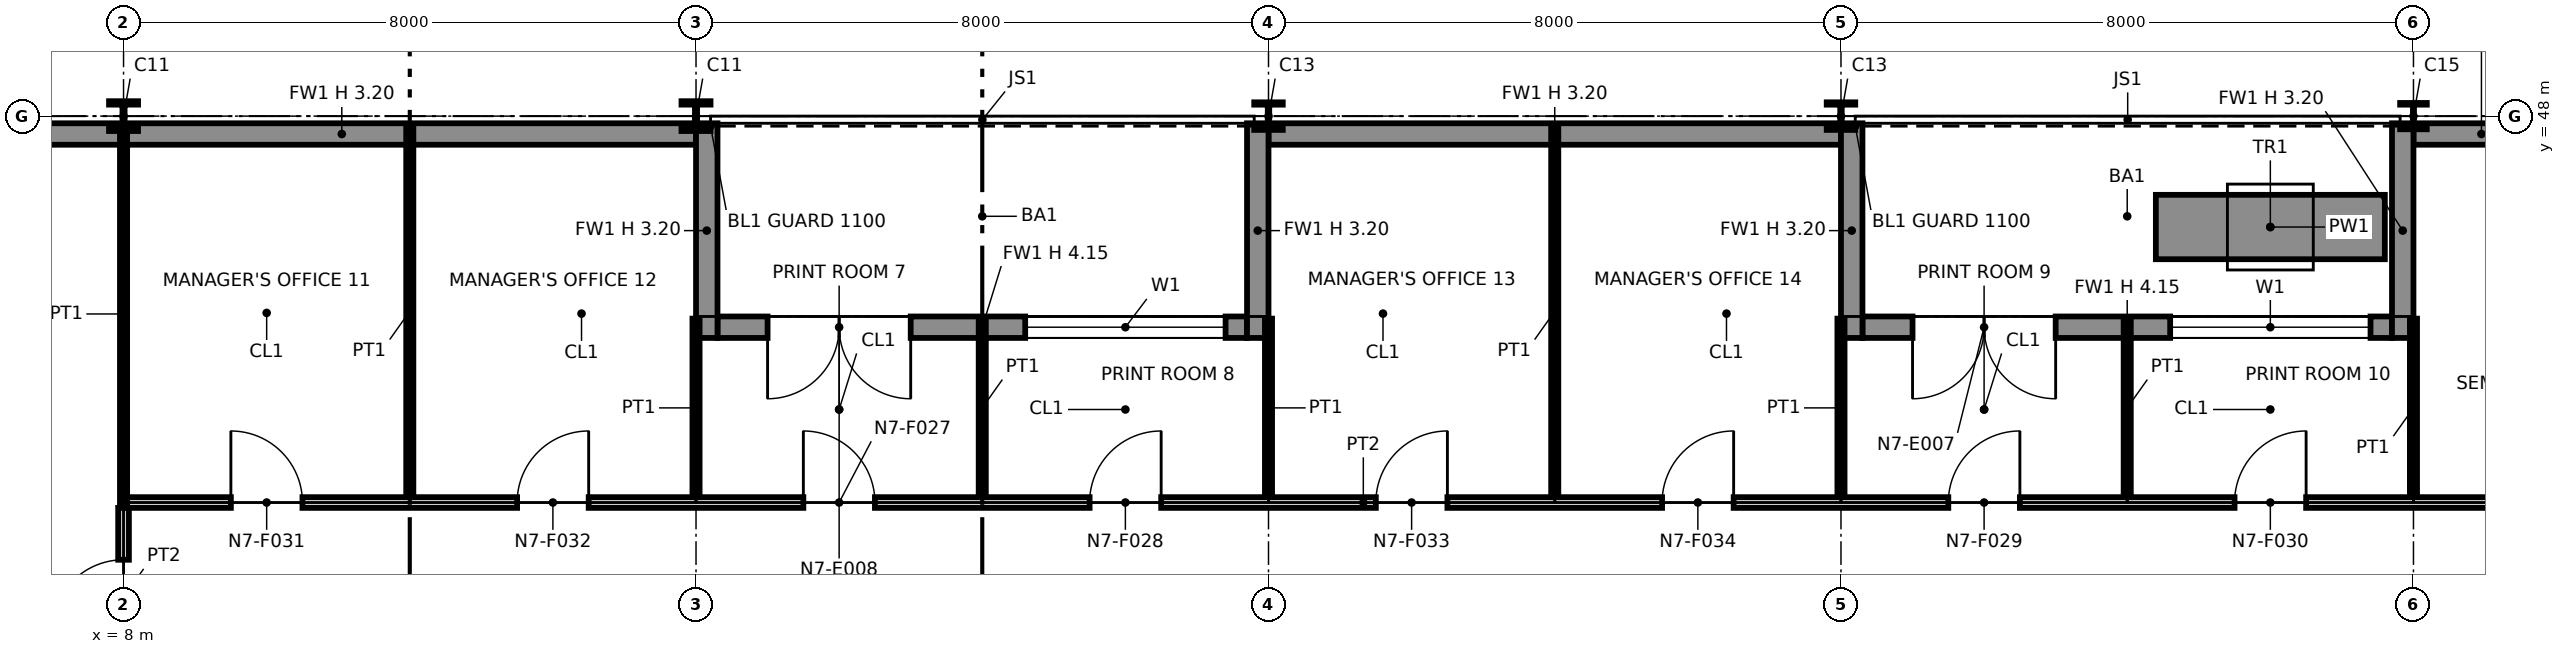
"""IFC4 building model, lengths in metres.
Left out: names, types, materials, properties, quantities, classifications, styles, units other than length and angle.
Written with IfcOpenShell. Run it as: python <this file> out.ifc"""

import sys

from ifc_helpers import new_model, si_unit, direction, frame, frame_2d, origin, origin_2d, place, context, subcontext, project, spatial, rectangle, i_section, extrude, element, fill, save


model = new_model("IFC4")
c1 = context("Model", 3, precision=1e-05, world=origin(), true_north=direction((0.0, 1.0)))
c2 = subcontext(c1, "Body", "Model", "MODEL_VIEW")
j1 = project(units=[si_unit("LENGTHUNIT", "METRE"), si_unit("PLANEANGLEUNIT", "RADIAN")], contexts=[c1])
p1 = place(None, origin())
s1 = spatial("IfcSite", under=j1, at=p1, CompositionType="ELEMENT")
p2 = place(p1, origin())
s2 = spatial("IfcBuilding", under=s1, at=p2, CompositionType="ELEMENT")
p3 = place(p2, frame((0.0, 0.0, 109.6)))
s3 = spatial("IfcBuildingStorey", under=s2, at=p3, CompositionType="ELEMENT", Elevation=109.6)
for number, where, z_axis, x_axis in (
    (1, (8.0, 48.0, 0.0), (0.0, 0.0, 1.0), (1.0, 0.0, 0.0)),
    (2, (16.0, 48.0, 0.0), (0.0, 0.0, 1.0), (1.0, 0.0, 0.0)),
):
    element("IfcColumn", number, at=place(p3, frame(where, z_axis=z_axis, x_axis=x_axis)), inside=s3, PredefinedType="COLUMN", context=c2, shape_type="SweptSolid", body=[
        extrude(i_section(OverallWidth=0.406, OverallDepth=0.417, WebThickness=0.03, FlangeThickness=0.048, at=origin_2d()), origin(), (0.0, 0.0, 1.0), 4.15),
    ])
for number, where, z_axis, x_axis in (
    (3, (24.0, 48.0, 0.0), (0.0, 0.0, 1.0), (1.0, 0.0, 0.0)),
    (4, (32.0, 48.0, 0.0), (0.0, 0.0, 1.0), (1.0, 0.0, 0.0)),
):
    element("IfcColumn", number, at=place(p3, frame(where, z_axis=z_axis, x_axis=x_axis)), inside=s3, PredefinedType="COLUMN", context=c2, shape_type="SweptSolid", body=[
        extrude(i_section(OverallWidth=0.399, OverallDepth=0.386, WebThickness=0.021, FlangeThickness=0.033, at=origin_2d()), origin(), (0.0, 0.0, 1.0), 4.15),
    ])
p4 = place(p3, frame((40.0, 48.0, 0.0), z_axis=(0.0, 0.0, 1.0), x_axis=(1.0, 0.0, 0.0)))
e5 = element("IfcColumn", 5, at=p4, inside=s3, PredefinedType="COLUMN", context=c2, shape_type="SweptSolid", body=[
    extrude(i_section(OverallWidth=0.373, OverallDepth=0.368, WebThickness=0.015, FlangeThickness=0.024, at=origin_2d()), origin(), (0.0, 0.0, 1.0), 4.15),
])
p5 = place(p3, frame((41.9, 47.75, 0.0), z_axis=(0.0, 0.0, 1.0), x_axis=(-1.0, 0.0, 0.0)))
e6 = element("IfcWall", 6, at=p5, inside=s3, PredefinedType="SOLIDWALL", context=c2, shape_type="SweptSolid", body=[
    extrude(rectangle(XDim=1.9, YDim=0.3, at=frame_2d((0.95, 0.0))), origin(), (0.0, 0.0, 1.0), 3.199),
])
p6 = place(p3, frame((39.7, 45.05, 0.0), z_axis=(0.0, 0.0, 1.0), x_axis=(-1.0, 0.0, 0.0)))
e7 = element("IfcWall", 7, at=p6, inside=s3, PredefinedType="SOLIDWALL", context=c2, shape_type="SweptSolid", body=[
    extrude(rectangle(XDim=7.4, YDim=0.3, at=frame_2d((3.7, 0.0))), origin(), (0.0, 0.0, 1.0), 4.15),
])
p7 = place(p6, frame((0.3, 0.0, 0.9)))
e8 = element("IfcOpeningElement", 8, at=p7, cuts=e7, PredefinedType="OPENING", context=c2, shape_type="SweptSolid", body=[
    extrude(rectangle(XDim=2.8, YDim=2.2, at=frame_2d((1.4, 1.1))), frame((0.0, 0.16, 0.0), z_axis=(0.0, -1.0, 0.0), x_axis=(1.0, 0.0, 0.0)), (0.0, 0.0, 1.0), 0.32),
])
p8 = place(p6, frame((4.7, 0.0, 0.0)))
e9 = element("IfcOpeningElement", 9, at=p8, cuts=e7, PredefinedType="OPENING", context=c2, shape_type="SweptSolid", body=[
    extrude(rectangle(XDim=2.0, YDim=2.4, at=frame_2d((1.0, 1.2))), frame((0.0, 0.16, 0.0), z_axis=(0.0, -1.0, 0.0), x_axis=(1.0, 0.0, 0.0)), (0.0, 0.0, 1.0), 0.32),
])
for number, where, z_axis, x_axis in (
    (10, (39.85, 47.9, 0.0), (0.0, 0.0, 1.0), (0.0, -1.0, 0.0)),
    (11, (32.15, 47.9, 0.0), (0.0, 0.0, 1.0), (0.0, -1.0, 0.0)),
):
    element("IfcWall", number, at=place(p3, frame(where, z_axis=z_axis, x_axis=x_axis)), inside=s3, PredefinedType="SOLIDWALL", context=c2, shape_type="SweptSolid", body=[
        extrude(rectangle(XDim=3.0, YDim=0.3, at=frame_2d((1.5, 0.0))), origin(), (0.0, 0.0, 1.0), 3.199),
    ])
p9 = place(p3, frame((32.0, 47.75, 0.0), z_axis=(0.0, 0.0, 1.0), x_axis=(-1.0, 0.0, 0.0)))
e12 = element("IfcWall", 12, at=p9, inside=s3, PredefinedType="SOLIDWALL", context=c2, shape_type="SweptSolid", body=[
    extrude(rectangle(XDim=8.0, YDim=0.3, at=frame_2d((4.0, 0.0))), origin(), (0.0, 0.0, 1.0), 3.199),
])
p10 = place(p3, frame((23.7, 45.05, 0.0), z_axis=(0.0, 0.0, 1.0), x_axis=(-1.0, 0.0, 0.0)))
e13 = element("IfcWall", 13, at=p10, inside=s3, PredefinedType="SOLIDWALL", context=c2, shape_type="SweptSolid", body=[
    extrude(rectangle(XDim=7.4, YDim=0.3, at=frame_2d((3.7, 0.0))), origin(), (0.0, 0.0, 1.0), 4.15),
])
p11 = place(p10, frame((0.3, 0.0, 0.9)))
e14 = element("IfcOpeningElement", 14, at=p11, cuts=e13, PredefinedType="OPENING", context=c2, shape_type="SweptSolid", body=[
    extrude(rectangle(XDim=2.8, YDim=2.2, at=frame_2d((1.4, 1.1))), frame((0.0, 0.16, 0.0), z_axis=(0.0, -1.0, 0.0), x_axis=(1.0, 0.0, 0.0)), (0.0, 0.0, 1.0), 0.32),
])
p12 = place(p10, frame((4.7, 0.0, 0.0)))
e15 = element("IfcOpeningElement", 15, at=p12, cuts=e13, PredefinedType="OPENING", context=c2, shape_type="SweptSolid", body=[
    extrude(rectangle(XDim=2.0, YDim=2.4, at=frame_2d((1.0, 1.2))), frame((0.0, 0.16, 0.0), z_axis=(0.0, -1.0, 0.0), x_axis=(1.0, 0.0, 0.0)), (0.0, 0.0, 1.0), 0.32),
])
for number, where, z_axis, x_axis in (
    (16, (23.85, 47.9, 0.0), (0.0, 0.0, 1.0), (0.0, -1.0, 0.0)),
    (17, (16.15, 47.9, 0.0), (0.0, 0.0, 1.0), (0.0, -1.0, 0.0)),
):
    element("IfcWall", number, at=place(p3, frame(where, z_axis=z_axis, x_axis=x_axis)), inside=s3, PredefinedType="SOLIDWALL", context=c2, shape_type="SweptSolid", body=[
        extrude(rectangle(XDim=3.0, YDim=0.3, at=frame_2d((1.5, 0.0))), origin(), (0.0, 0.0, 1.0), 3.199),
    ])
p13 = place(p3, frame((16.0, 47.75, 0.0), z_axis=(0.0, 0.0, 1.0), x_axis=(-1.0, 0.0, 0.0)))
e18 = element("IfcWall", 18, at=p13, inside=s3, PredefinedType="SOLIDWALL", context=c2, shape_type="SweptSolid", body=[
    extrude(rectangle(XDim=9.9, YDim=0.3, at=frame_2d((4.95, 0.0))), origin(), (0.0, 0.0, 1.0), 3.199),
])
p14 = place(p3, frame((39.6, 46.45, 0.0), z_axis=(0.0, 0.0, 1.0), x_axis=(-1.0, 0.0, 0.0)))
e19 = element("IfcWall", 19, at=p14, inside=s3, PredefinedType="SOLIDWALL", context=c2, shape_type="SweptSolid", body=[
    extrude(rectangle(XDim=3.2, YDim=0.9, at=frame_2d((1.6, 0.0))), origin(), (0.0, 0.0, 1.0), 0.6),
])
p15 = place(p3, frame((8.0, 40.03, 0.0), z_axis=(0.0, 0.0, 1.0), x_axis=(0.0, 1.0, 0.0)))
e20 = element("IfcWall", 20, at=p15, inside=s3, PredefinedType="PARTITIONING", context=c2, shape_type="SweptSolid", body=[
    extrude(rectangle(XDim=2.495, YDim=0.15, at=frame_2d((1.248, 0.0))), origin(), (0.0, 0.0, 1.0), 3.194),
])
p16 = place(p15, frame((0.77, 0.0, 0.0)))
e21 = element("IfcOpeningElement", 21, at=p16, cuts=e20, PredefinedType="OPENING", context=c2, shape_type="SweptSolid", body=[
    extrude(rectangle(XDim=1.0, YDim=2.1, at=frame_2d((0.5, 1.05))), frame((0.0, 0.085, 0.0), z_axis=(0.0, -1.0, 0.0), x_axis=(1.0, 0.0, 0.0)), (0.0, 0.0, 1.0), 0.17),
])
p17 = place(p3, frame((8.05, 42.6, 0.0), z_axis=(0.0, 0.0, 1.0), x_axis=(1.0, 0.0, 0.0)))
e22 = element("IfcWall", 22, at=p17, inside=s3, PredefinedType="PARTITIONING", context=c2, shape_type="SweptSolid", body=[
    extrude(rectangle(XDim=34.55, YDim=0.15, at=frame_2d((17.275, 0.0))), origin(), (0.0, 0.0, 1.0), 3.194),
])
p18 = place(p17, frame((9.45, 0.0, 0.0)))
e23 = element("IfcOpeningElement", 23, at=p18, cuts=e22, PredefinedType="OPENING", context=c2, shape_type="SweptSolid", body=[
    extrude(rectangle(XDim=1.0, YDim=2.1, at=frame_2d((0.5, 1.05))), frame((0.0, 0.085, 0.0), z_axis=(0.0, -1.0, 0.0), x_axis=(1.0, 0.0, 0.0)), (0.0, 0.0, 1.0), 0.17),
])
p19 = place(p17, frame((13.45, 0.0, 0.0)))
e24 = element("IfcOpeningElement", 24, at=p19, cuts=e22, PredefinedType="OPENING", context=c2, shape_type="SweptSolid", body=[
    extrude(rectangle(XDim=1.0, YDim=2.1, at=frame_2d((0.5, 1.05))), frame((0.0, 0.085, 0.0), z_axis=(0.0, -1.0, 0.0), x_axis=(1.0, 0.0, 0.0)), (0.0, 0.0, 1.0), 0.17),
])
p20 = place(p17, frame((25.45, 0.0, 0.0)))
e25 = element("IfcOpeningElement", 25, at=p20, cuts=e22, PredefinedType="OPENING", context=c2, shape_type="SweptSolid", body=[
    extrude(rectangle(XDim=1.0, YDim=2.1, at=frame_2d((0.5, 1.05))), frame((0.0, 0.085, 0.0), z_axis=(0.0, -1.0, 0.0), x_axis=(1.0, 0.0, 0.0)), (0.0, 0.0, 1.0), 0.17),
])
p21 = place(p17, frame((29.45, 0.0, 0.0)))
e26 = element("IfcOpeningElement", 26, at=p21, cuts=e22, PredefinedType="OPENING", context=c2, shape_type="SweptSolid", body=[
    extrude(rectangle(XDim=1.0, YDim=2.1, at=frame_2d((0.5, 1.05))), frame((0.0, 0.085, 0.0), z_axis=(0.0, -1.0, 0.0), x_axis=(1.0, 0.0, 0.0)), (0.0, 0.0, 1.0), 0.17),
])
p22 = place(p17, frame((1.45, 0.0, 0.0)))
e27 = element("IfcOpeningElement", 27, at=p22, cuts=e22, PredefinedType="OPENING", context=c2, shape_type="SweptSolid", body=[
    extrude(rectangle(XDim=1.0, YDim=2.1, at=frame_2d((0.5, 1.05))), frame((0.0, 0.085, 0.0), z_axis=(0.0, -1.0, 0.0), x_axis=(1.0, 0.0, 0.0)), (0.0, 0.0, 1.0), 0.17),
])
p23 = place(p17, frame((5.45, 0.0, 0.0)))
e28 = element("IfcOpeningElement", 28, at=p23, cuts=e22, PredefinedType="OPENING", context=c2, shape_type="SweptSolid", body=[
    extrude(rectangle(XDim=1.0, YDim=2.1, at=frame_2d((0.5, 1.05))), frame((0.0, 0.085, 0.0), z_axis=(0.0, -1.0, 0.0), x_axis=(1.0, 0.0, 0.0)), (0.0, 0.0, 1.0), 0.17),
])
p24 = place(p17, frame((17.45, 0.0, 0.0)))
e29 = element("IfcOpeningElement", 29, at=p24, cuts=e22, PredefinedType="OPENING", context=c2, shape_type="SweptSolid", body=[
    extrude(rectangle(XDim=1.0, YDim=2.1, at=frame_2d((0.5, 1.05))), frame((0.0, 0.085, 0.0), z_axis=(0.0, -1.0, 0.0), x_axis=(1.0, 0.0, 0.0)), (0.0, 0.0, 1.0), 0.17),
])
p25 = place(p17, frame((21.45, 0.0, 0.0)))
e30 = element("IfcOpeningElement", 30, at=p25, cuts=e22, PredefinedType="OPENING", context=c2, shape_type="SweptSolid", body=[
    extrude(rectangle(XDim=1.0, YDim=2.1, at=frame_2d((0.5, 1.05))), frame((0.0, 0.085, 0.0), z_axis=(0.0, -1.0, 0.0), x_axis=(1.0, 0.0, 0.0)), (0.0, 0.0, 1.0), 0.17),
])
p26 = place(p3, frame((8.0, 42.6, 0.0), z_axis=(0.0, 0.0, 1.0), x_axis=(0.0, 1.0, 0.0)))
e31 = element("IfcWall", 31, at=p26, inside=s3, PredefinedType="PARTITIONING", context=c2, shape_type="SweptSolid", body=[
    extrude(rectangle(XDim=5.27, YDim=0.1, at=frame_2d((2.635, 0.0))), origin(), (0.0, 0.0, 1.0), 3.194),
])
p27 = place(p3, frame((12.0, 42.675, 0.0), z_axis=(0.0, 0.0, 1.0), x_axis=(0.0, 1.0, 0.0)))
e32 = element("IfcWall", 32, at=p27, inside=s3, PredefinedType="PARTITIONING", context=c2, shape_type="SweptSolid", body=[
    extrude(rectangle(XDim=5.195, YDim=0.1, at=frame_2d((2.598, 0.0))), origin(), (0.0, 0.0, 1.0), 3.194),
])
for number, where, z_axis, x_axis in (
    (33, (16.0, 42.675, 0.0), (0.0, 0.0, 1.0), (0.0, 1.0, 0.0)),
    (34, (20.0, 42.675, 0.0), (0.0, 0.0, 1.0), (0.0, 1.0, 0.0)),
    (35, (24.0, 42.675, 0.0), (0.0, 0.0, 1.0), (0.0, 1.0, 0.0)),
):
    element("IfcWall", number, at=place(p3, frame(where, z_axis=z_axis, x_axis=x_axis)), inside=s3, PredefinedType="PARTITIONING", context=c2, shape_type="SweptSolid", body=[
        extrude(rectangle(XDim=2.495, YDim=0.1, at=frame_2d((1.248, 0.0))), origin(), (0.0, 0.0, 1.0), 3.194),
    ])
p28 = place(p3, frame((28.0, 42.675, 0.0), z_axis=(0.0, 0.0, 1.0), x_axis=(0.0, 1.0, 0.0)))
e36 = element("IfcWall", 36, at=p28, inside=s3, PredefinedType="PARTITIONING", context=c2, shape_type="SweptSolid", body=[
    extrude(rectangle(XDim=5.195, YDim=0.1, at=frame_2d((2.598, 0.0))), origin(), (0.0, 0.0, 1.0), 3.194),
])
for number, where, z_axis, x_axis in (
    (37, (32.0, 42.675, 0.0), (0.0, 0.0, 1.0), (0.0, 1.0, 0.0)),
    (38, (36.0, 42.675, 0.0), (0.0, 0.0, 1.0), (0.0, 1.0, 0.0)),
    (39, (40.0, 42.675, 0.0), (0.0, 0.0, 1.0), (0.0, 1.0, 0.0)),
):
    element("IfcWall", number, at=place(p3, frame(where, z_axis=z_axis, x_axis=x_axis)), inside=s3, PredefinedType="PARTITIONING", context=c2, shape_type="SweptSolid", body=[
        extrude(rectangle(XDim=2.495, YDim=0.1, at=frame_2d((1.248, 0.0))), origin(), (0.0, 0.0, 1.0), 3.194),
    ])
p29 = place(p7, origin())
e40 = element("IfcWindow", 40, at=p29, inside=s3, PartitioningType="SINGLE_PANEL", PredefinedType="WINDOW", context=c2, shape_type="SweptSolid", body=[
    extrude(rectangle(XDim=2.8, YDim=2.2, at=frame_2d((1.4, 1.1))), frame((0.0, 0.03, 0.0), z_axis=(0.0, -1.0, 0.0), x_axis=(1.0, 0.0, 0.0)), (0.0, 0.0, 1.0), 0.06),
])
fill(e8, e40)
p30 = place(p8, origin())
e41 = element("IfcDoor", 41, at=p30, inside=s3, OperationType="DOUBLE_DOOR_SINGLE_SWING", PredefinedType="DOOR", context=c2, shape_type="SweptSolid", body=[
    extrude(rectangle(XDim=2.0, YDim=2.4, at=frame_2d((1.0, 1.2))), frame((0.0, 0.025, 0.0), z_axis=(0.0, -1.0, 0.0), x_axis=(1.0, 0.0, 0.0)), (0.0, 0.0, 1.0), 0.05),
])
fill(e9, e41)
p31 = place(p11, origin())
e42 = element("IfcWindow", 42, at=p31, inside=s3, PartitioningType="SINGLE_PANEL", PredefinedType="WINDOW", context=c2, shape_type="SweptSolid", body=[
    extrude(rectangle(XDim=2.8, YDim=2.2, at=frame_2d((1.4, 1.1))), frame((0.0, 0.03, 0.0), z_axis=(0.0, -1.0, 0.0), x_axis=(1.0, 0.0, 0.0)), (0.0, 0.0, 1.0), 0.06),
])
fill(e14, e42)
p32 = place(p12, origin())
e43 = element("IfcDoor", 43, at=p32, inside=s3, OperationType="DOUBLE_DOOR_SINGLE_SWING", PredefinedType="DOOR", context=c2, shape_type="SweptSolid", body=[
    extrude(rectangle(XDim=2.0, YDim=2.4, at=frame_2d((1.0, 1.2))), frame((0.0, 0.025, 0.0), z_axis=(0.0, -1.0, 0.0), x_axis=(1.0, 0.0, 0.0)), (0.0, 0.0, 1.0), 0.05),
])
fill(e15, e43)
p33 = place(p16, origin())
e44 = element("IfcDoor", 44, at=p33, inside=s3, OperationType="SINGLE_SWING_LEFT", PredefinedType="DOOR", context=c2, shape_type="SweptSolid", body=[
    extrude(rectangle(XDim=1.0, YDim=2.1, at=frame_2d((0.5, 1.05))), frame((0.0, 0.025, 0.0), z_axis=(0.0, -1.0, 0.0), x_axis=(1.0, 0.0, 0.0)), (0.0, 0.0, 1.0), 0.05),
])
fill(e21, e44)
p34 = place(p18, origin())
e45 = element("IfcDoor", 45, at=p34, inside=s3, OperationType="SINGLE_SWING_LEFT", PredefinedType="DOOR", context=c2, shape_type="SweptSolid", body=[
    extrude(rectangle(XDim=1.0, YDim=2.1, at=frame_2d((0.5, 1.05))), frame((0.0, 0.025, 0.0), z_axis=(0.0, -1.0, 0.0), x_axis=(1.0, 0.0, 0.0)), (0.0, 0.0, 1.0), 0.05),
])
fill(e23, e45)
p35 = place(p19, origin())
e46 = element("IfcDoor", 46, at=p35, inside=s3, OperationType="SINGLE_SWING_RIGHT", PredefinedType="DOOR", context=c2, shape_type="SweptSolid", body=[
    extrude(rectangle(XDim=1.0, YDim=2.1, at=frame_2d((0.5, 1.05))), frame((0.0, 0.025, 0.0), z_axis=(0.0, -1.0, 0.0), x_axis=(1.0, 0.0, 0.0)), (0.0, 0.0, 1.0), 0.05),
])
fill(e24, e46)
p36 = place(p20, origin())
e47 = element("IfcDoor", 47, at=p36, inside=s3, OperationType="SINGLE_SWING_RIGHT", PredefinedType="DOOR", context=c2, shape_type="SweptSolid", body=[
    extrude(rectangle(XDim=1.0, YDim=2.1, at=frame_2d((0.5, 1.05))), frame((0.0, 0.025, 0.0), z_axis=(0.0, -1.0, 0.0), x_axis=(1.0, 0.0, 0.0)), (0.0, 0.0, 1.0), 0.05),
])
fill(e25, e47)
p37 = place(p21, origin())
e48 = element("IfcDoor", 48, at=p37, inside=s3, OperationType="SINGLE_SWING_RIGHT", PredefinedType="DOOR", context=c2, shape_type="SweptSolid", body=[
    extrude(rectangle(XDim=1.0, YDim=2.1, at=frame_2d((0.5, 1.05))), frame((0.0, 0.025, 0.0), z_axis=(0.0, -1.0, 0.0), x_axis=(1.0, 0.0, 0.0)), (0.0, 0.0, 1.0), 0.05),
])
fill(e26, e48)
p38 = place(p22, origin())
e49 = element("IfcDoor", 49, at=p38, inside=s3, OperationType="SINGLE_SWING_LEFT", PredefinedType="DOOR", context=c2, shape_type="SweptSolid", body=[
    extrude(rectangle(XDim=1.0, YDim=2.1, at=frame_2d((0.5, 1.05))), frame((0.0, 0.025, 0.0), z_axis=(0.0, -1.0, 0.0), x_axis=(1.0, 0.0, 0.0)), (0.0, 0.0, 1.0), 0.05),
])
fill(e27, e49)
p39 = place(p23, origin())
e50 = element("IfcDoor", 50, at=p39, inside=s3, OperationType="SINGLE_SWING_RIGHT", PredefinedType="DOOR", context=c2, shape_type="SweptSolid", body=[
    extrude(rectangle(XDim=1.0, YDim=2.1, at=frame_2d((0.5, 1.05))), frame((0.0, 0.025, 0.0), z_axis=(0.0, -1.0, 0.0), x_axis=(1.0, 0.0, 0.0)), (0.0, 0.0, 1.0), 0.05),
])
fill(e28, e50)
p40 = place(p24, origin())
e51 = element("IfcDoor", 51, at=p40, inside=s3, OperationType="SINGLE_SWING_RIGHT", PredefinedType="DOOR", context=c2, shape_type="SweptSolid", body=[
    extrude(rectangle(XDim=1.0, YDim=2.1, at=frame_2d((0.5, 1.05))), frame((0.0, 0.025, 0.0), z_axis=(0.0, -1.0, 0.0), x_axis=(1.0, 0.0, 0.0)), (0.0, 0.0, 1.0), 0.05),
])
fill(e29, e51)
p41 = place(p25, origin())
e52 = element("IfcDoor", 52, at=p41, inside=s3, OperationType="SINGLE_SWING_RIGHT", PredefinedType="DOOR", context=c2, shape_type="SweptSolid", body=[
    extrude(rectangle(XDim=1.0, YDim=2.1, at=frame_2d((0.5, 1.05))), frame((0.0, 0.025, 0.0), z_axis=(0.0, -1.0, 0.0), x_axis=(1.0, 0.0, 0.0)), (0.0, 0.0, 1.0), 0.05),
])
fill(e30, e52)
save(model, sys.argv[1])
